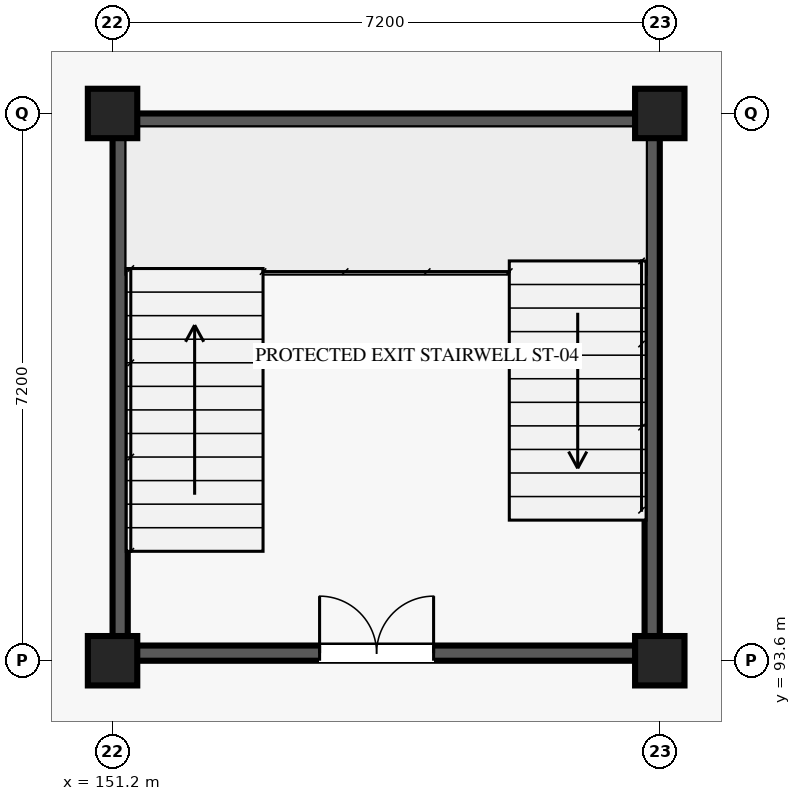
"""IFC4 building model, lengths in metres.
Left out: names, types, materials, properties, quantities, classifications, styles, units other than length and angle.
Written with IfcOpenShell. Run it as: python <this file> out.ifc"""

import sys

from ifc_helpers import new_model, si_unit, direction, frame, frame_2d, origin, origin_2d, place, context, subcontext, project, spatial, rectangle, extrude, element, fill, save


model = new_model("IFC4")
c1 = context("Model", 3, precision=1e-05, world=origin(), true_north=direction((0.0, 1.0)))
c2 = subcontext(c1, "Body", "Model", "MODEL_VIEW")
j1 = project(units=[si_unit("LENGTHUNIT", "METRE"), si_unit("PLANEANGLEUNIT", "RADIAN")], contexts=[c1])
p1 = place(None, origin())
s1 = spatial("IfcSite", under=j1, at=p1, CompositionType="ELEMENT")
p2 = place(p1, origin())
s2 = spatial("IfcBuilding", under=s1, at=p2, CompositionType="ELEMENT")
p3 = place(p2, frame((0.0, 0.0, -4.5)))
s3 = spatial("IfcBuildingStorey", under=s2, at=p3, CompositionType="ELEMENT", Elevation=-4.5)
for number, where, z_axis, x_axis in (
    (1, (151.2, 93.6, 0.0), (0.0, 0.0, 1.0), (1.0, 0.0, 0.0)),
    (2, (151.2, 100.8, 0.0), (0.0, 0.0, 1.0), (1.0, 0.0, 0.0)),
    (3, (158.4, 93.6, 0.0), (0.0, 0.0, 1.0), (1.0, 0.0, 0.0)),
    (4, (158.4, 100.8, 0.0), (0.0, 0.0, 1.0), (1.0, 0.0, 0.0)),
):
    element("IfcColumn", number, at=place(p3, frame(where, z_axis=z_axis, x_axis=x_axis)), inside=s3, PredefinedType="COLUMN", context=c2, shape_type="SweptSolid", body=[
        extrude(rectangle(XDim=0.65, YDim=0.65, at=origin_2d()), origin(), (0.0, 0.0, 1.0), 4.5),
    ])
p4 = place(p3, frame((151.4, 93.7, 0.0), z_axis=(0.0, 0.0, 1.0), x_axis=(1.0, 0.0, 0.0)))
e5 = element("IfcWall", 5, at=p4, inside=s3, PredefinedType="SHEAR", context=c2, shape_type="SweptSolid", body=[
    extrude(rectangle(XDim=6.8, YDim=0.2, at=frame_2d((3.4, 0.0))), origin(), (0.0, 0.0, 1.0), 4.25),
])
p5 = place(p4, frame((2.524, 0.0, 0.0)))
e6 = element("IfcOpeningElement", 6, at=p5, cuts=e5, PredefinedType="OPENING", context=c2, shape_type="SweptSolid", body=[
    extrude(rectangle(XDim=1.5, YDim=2.15, at=frame_2d((0.75, 1.075))), frame((0.0, 0.11, 0.0), z_axis=(0.0, -1.0, 0.0), x_axis=(1.0, 0.0, 0.0)), (0.0, 0.0, 1.0), 0.22),
])
for number, where, z_axis, x_axis in (
    (7, (151.4, 100.7, 0.0), (0.0, 0.0, 1.0), (1.0, 0.0, 0.0)),
    (8, (151.3, 93.8, 0.0), (0.0, 0.0, 1.0), (0.0, 1.0, 0.0)),
    (9, (158.3, 93.8, 0.0), (0.0, 0.0, 1.0), (0.0, 1.0, 0.0)),
):
    element("IfcWall", number, at=place(p3, frame(where, z_axis=z_axis, x_axis=x_axis)), inside=s3, PredefinedType="SHEAR", context=c2, shape_type="SweptSolid", body=[
        extrude(rectangle(XDim=6.8, YDim=0.2, at=frame_2d((3.4, 0.0))), origin(), (0.0, 0.0, 1.0), 4.25),
    ])
p6 = place(p5, origin())
e10 = element("IfcDoor", 10, at=p6, inside=s3, OperationType="DOUBLE_DOOR_SINGLE_SWING", PredefinedType="DOOR", context=c2, shape_type="SweptSolid", body=[
    extrude(rectangle(XDim=1.5, YDim=2.15, at=frame_2d((0.75, 1.075))), frame((0.0, 0.025, 0.0), z_axis=(0.0, -1.0, 0.0), x_axis=(1.0, 0.0, 0.0)), (0.0, 0.0, 1.0), 0.05),
])
fill(e6, e10)
save(model, sys.argv[1])
